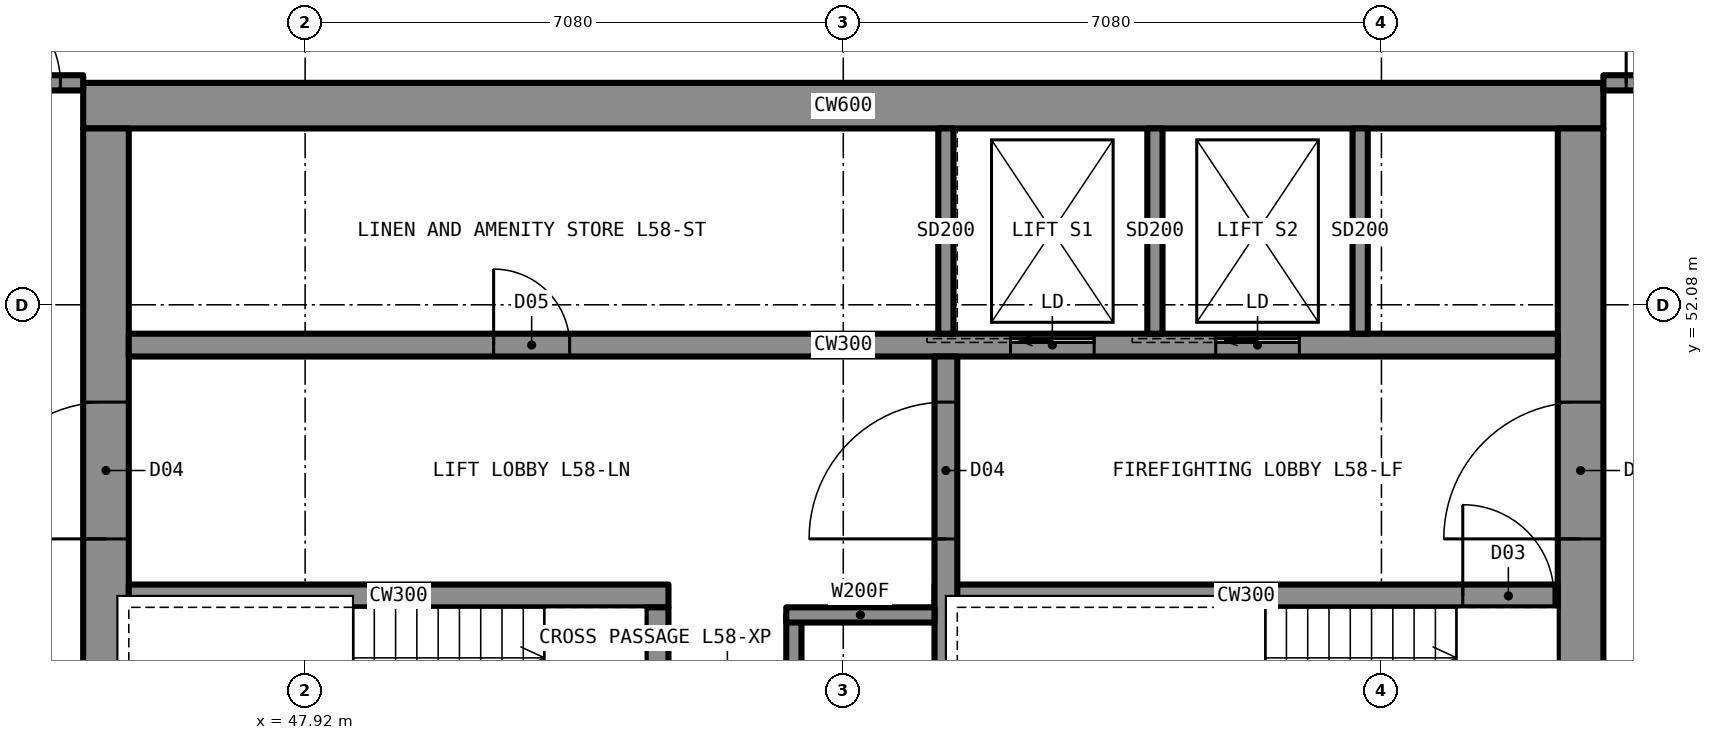
"""IFC4 building model, lengths in metres.
Left out: names, types, materials, properties, quantities, classifications, styles, units other than length and angle.
Written with IfcOpenShell. Run it as: python <this file> out.ifc"""

import sys

from ifc_helpers import new_model, si_unit, direction, frame, frame_2d, origin, place, context, subcontext, project, spatial, rectangle, extrude, element, fill, save


model = new_model("IFC4")
c1 = context("Model", 3, precision=1e-05, world=origin(), true_north=direction((0.0, 1.0)))
c2 = subcontext(c1, "Body", "Model", "MODEL_VIEW")
j1 = project(units=[si_unit("LENGTHUNIT", "METRE"), si_unit("PLANEANGLEUNIT", "RADIAN")], contexts=[c1])
p1 = place(None, origin())
s1 = spatial("IfcSite", under=j1, at=p1, CompositionType="ELEMENT")
p2 = place(p1, origin())
s2 = spatial("IfcBuilding", under=s1, at=p2, CompositionType="ELEMENT")
p3 = place(p2, frame((0.0, 0.0, 214.3)))
s3 = spatial("IfcBuildingStorey", under=s2, at=p3, CompositionType="ELEMENT", Elevation=214.3)
p4 = place(p3, frame((45.0, 54.7, 0.0), z_axis=(0.0, 0.0, 1.0), x_axis=(1.0, 0.0, 0.0)))
e1 = element("IfcWall", 1, at=p4, inside=s3, PredefinedType="SHEAR", context=c2, shape_type="SweptSolid", body=[
    extrude(rectangle(XDim=20.0, YDim=0.6, at=frame_2d((10.0, 0.0))), origin(), (0.0, 0.0, 1.0), 3.5),
])
p5 = place(p3, frame((64.7, 35.6, 0.0), z_axis=(0.0, 0.0, 1.0), x_axis=(0.0, 1.0, 0.0)))
e2 = element("IfcWall", 2, at=p5, inside=s3, PredefinedType="SHEAR", context=c2, shape_type="SweptSolid", body=[
    extrude(rectangle(XDim=18.8, YDim=0.6, at=frame_2d((9.4, 0.0))), origin(), (0.0, 0.0, 1.0), 3.5),
])
p6 = place(p5, frame((13.4, 0.0, 0.0)))
e3 = element("IfcOpeningElement", 3, at=p6, cuts=e2, PredefinedType="OPENING", context=c2, shape_type="SweptSolid", body=[
    extrude(rectangle(XDim=1.8, YDim=2.2, at=frame_2d((0.9, 1.1))), frame((0.0, 0.31, 0.0), z_axis=(0.0, -1.0, 0.0), x_axis=(1.0, 0.0, 0.0)), (0.0, 0.0, 1.0), 0.62),
])
p7 = place(p5, frame((3.6, 0.0, 0.0)))
e4 = element("IfcOpeningElement", 4, at=p7, cuts=e2, PredefinedType="OPENING", context=c2, shape_type="SweptSolid", body=[
    extrude(rectangle(XDim=1.8, YDim=2.2, at=frame_2d((0.9, 1.1))), frame((0.0, 0.31, 0.0), z_axis=(0.0, -1.0, 0.0), x_axis=(1.0, 0.0, 0.0)), (0.0, 0.0, 1.0), 0.62),
])
p8 = place(p3, frame((45.3, 35.6, 0.0), z_axis=(0.0, 0.0, 1.0), x_axis=(0.0, 1.0, 0.0)))
e5 = element("IfcWall", 5, at=p8, inside=s3, PredefinedType="SHEAR", context=c2, shape_type="SweptSolid", body=[
    extrude(rectangle(XDim=18.8, YDim=0.6, at=frame_2d((9.4, 0.0))), origin(), (0.0, 0.0, 1.0), 3.5),
])
p9 = place(p8, frame((13.4, 0.0, 0.0)))
e6 = element("IfcOpeningElement", 6, at=p9, cuts=e5, PredefinedType="OPENING", context=c2, shape_type="SweptSolid", body=[
    extrude(rectangle(XDim=1.8, YDim=2.2, at=frame_2d((0.9, 1.1))), frame((0.0, 0.31, 0.0), z_axis=(0.0, -1.0, 0.0), x_axis=(1.0, 0.0, 0.0)), (0.0, 0.0, 1.0), 0.62),
])
p10 = place(p8, frame((3.6, 0.0, 0.0)))
e7 = element("IfcOpeningElement", 7, at=p10, cuts=e5, PredefinedType="OPENING", context=c2, shape_type="SweptSolid", body=[
    extrude(rectangle(XDim=1.8, YDim=2.2, at=frame_2d((0.9, 1.1))), frame((0.0, 0.31, 0.0), z_axis=(0.0, -1.0, 0.0), x_axis=(1.0, 0.0, 0.0)), (0.0, 0.0, 1.0), 0.62),
])
p11 = place(p8, frame((6.4, 0.0, 0.0)))
e8 = element("IfcOpeningElement", 8, at=p11, cuts=e5, PredefinedType="OPENING", context=c2, shape_type="SweptSolid", body=[
    extrude(rectangle(XDim=1.2, YDim=2.2, at=frame_2d((0.6, 1.1))), frame((0.0, 0.31, 0.0), z_axis=(0.0, -1.0, 0.0), x_axis=(1.0, 0.0, 0.0)), (0.0, 0.0, 1.0), 0.62),
])
p12 = place(p3, frame((45.6, 51.55, 0.0), z_axis=(0.0, 0.0, 1.0), x_axis=(1.0, 0.0, 0.0)))
e9 = element("IfcWall", 9, at=p12, inside=s3, PredefinedType="SHEAR", context=c2, shape_type="SweptSolid", body=[
    extrude(rectangle(XDim=18.8, YDim=0.3, at=frame_2d((9.4, 0.0))), origin(), (0.0, 0.0, 1.0), 3.5),
])
p13 = place(p12, frame((4.8, 0.0, 0.0)))
e10 = element("IfcOpeningElement", 10, at=p13, cuts=e9, PredefinedType="OPENING", context=c2, shape_type="SweptSolid", body=[
    extrude(rectangle(XDim=1.0, YDim=2.1, at=frame_2d((0.5, 1.05))), frame((0.0, 0.16, 0.0), z_axis=(0.0, -1.0, 0.0), x_axis=(1.0, 0.0, 0.0)), (0.0, 0.0, 1.0), 0.32),
])
p14 = place(p12, frame((11.6, 0.0, 0.0)))
e11 = element("IfcOpeningElement", 11, at=p14, cuts=e9, PredefinedType="OPENING", context=c2, shape_type="SweptSolid", body=[
    extrude(rectangle(XDim=1.1, YDim=2.2, at=frame_2d((0.55, 1.1))), frame((0.0, 0.16, 0.0), z_axis=(0.0, -1.0, 0.0), x_axis=(1.0, 0.0, 0.0)), (0.0, 0.0, 1.0), 0.32),
])
p15 = place(p12, frame((14.3, 0.0, 0.0)))
e12 = element("IfcOpeningElement", 12, at=p15, cuts=e9, PredefinedType="OPENING", context=c2, shape_type="SweptSolid", body=[
    extrude(rectangle(XDim=1.1, YDim=2.2, at=frame_2d((0.55, 1.1))), frame((0.0, 0.16, 0.0), z_axis=(0.0, -1.0, 0.0), x_axis=(1.0, 0.0, 0.0)), (0.0, 0.0, 1.0), 0.32),
])
p16 = place(p3, frame((45.6, 48.25, 0.0), z_axis=(0.0, 0.0, 1.0), x_axis=(1.0, 0.0, 0.0)))
e13 = element("IfcWall", 13, at=p16, inside=s3, PredefinedType="SHEAR", context=c2, shape_type="SweptSolid", body=[
    extrude(rectangle(XDim=7.1, YDim=0.3, at=frame_2d((3.55, 0.0))), origin(), (0.0, 0.0, 1.0), 3.5),
])
p17 = place(p3, frame((56.2, 48.25, 0.0), z_axis=(0.0, 0.0, 1.0), x_axis=(1.0, 0.0, 0.0)))
e14 = element("IfcWall", 14, at=p17, inside=s3, PredefinedType="SHEAR", context=c2, shape_type="SweptSolid", body=[
    extrude(rectangle(XDim=8.2, YDim=0.3, at=frame_2d((4.1, 0.0))), origin(), (0.0, 0.0, 1.0), 3.5),
])
p18 = place(p17, frame((6.95, 0.0, 0.0)))
e15 = element("IfcOpeningElement", 15, at=p18, cuts=e14, PredefinedType="OPENING", context=c2, shape_type="SweptSolid", body=[
    extrude(rectangle(XDim=1.2, YDim=2.2, at=frame_2d((0.6, 1.1))), frame((0.0, 0.16, 0.0), z_axis=(0.0, -1.0, 0.0), x_axis=(1.0, 0.0, 0.0)), (0.0, 0.0, 1.0), 0.32),
])
p19 = place(p3, frame((52.55, 41.9, 0.0), z_axis=(0.0, 0.0, 1.0), x_axis=(0.0, 1.0, 0.0)))
e16 = element("IfcWall", 16, at=p19, inside=s3, PredefinedType="SHEAR", context=c2, shape_type="SweptSolid", body=[
    extrude(rectangle(XDim=6.2, YDim=0.3, at=frame_2d((3.1, 0.0))), origin(), (0.0, 0.0, 1.0), 3.5),
])
p20 = place(p19, frame((4.125, 0.0, 0.0)))
e17 = element("IfcOpeningElement", 17, at=p20, cuts=e16, PredefinedType="OPENING", context=c2, shape_type="SweptSolid", body=[
    extrude(rectangle(XDim=1.2, YDim=2.2, at=frame_2d((0.6, 1.1))), frame((0.0, 0.16, 0.0), z_axis=(0.0, -1.0, 0.0), x_axis=(1.0, 0.0, 0.0)), (0.0, 0.0, 1.0), 0.32),
])
p21 = place(p3, frame((56.35, 41.9, 0.0), z_axis=(0.0, 0.0, 1.0), x_axis=(0.0, 1.0, 0.0)))
e18 = element("IfcWall", 18, at=p21, inside=s3, PredefinedType="SHEAR", context=c2, shape_type="SweptSolid", body=[
    extrude(rectangle(XDim=9.5, YDim=0.3, at=frame_2d((4.75, 0.0))), origin(), (0.0, 0.0, 1.0), 3.5),
])
p22 = place(p21, frame((7.1, 0.0, 0.0)))
e19 = element("IfcOpeningElement", 19, at=p22, cuts=e18, PredefinedType="OPENING", context=c2, shape_type="SweptSolid", body=[
    extrude(rectangle(XDim=1.8, YDim=2.2, at=frame_2d((0.9, 1.1))), frame((0.0, 0.16, 0.0), z_axis=(0.0, -1.0, 0.0), x_axis=(1.0, 0.0, 0.0)), (0.0, 0.0, 1.0), 0.32),
])
p23 = place(p3, frame((43.2, 55.0, 0.0), z_axis=(0.0, 0.0, 1.0), x_axis=(1.0, 0.0, 0.0)))
e20 = element("IfcWall", 20, at=p23, inside=s3, PredefinedType="PARTITIONING", context=c2, shape_type="SweptSolid", body=[
    extrude(rectangle(XDim=1.8, YDim=0.2, at=frame_2d((0.9, 0.0))), origin(), (0.0, 0.0, 1.0), 3.33),
])
p24 = place(p23, frame((0.3, 0.0, 0.0)))
e21 = element("IfcOpeningElement", 21, at=p24, cuts=e20, PredefinedType="OPENING", context=c2, shape_type="SweptSolid", body=[
    extrude(rectangle(XDim=1.2, YDim=2.2, at=frame_2d((0.6, 1.1))), frame((0.0, 0.11, 0.0), z_axis=(0.0, -1.0, 0.0), x_axis=(1.0, 0.0, 0.0)), (0.0, 0.0, 1.0), 0.22),
])
p25 = place(p3, frame((65.0, 55.0, 0.0), z_axis=(0.0, 0.0, 1.0), x_axis=(1.0, 0.0, 0.0)))
e22 = element("IfcWall", 22, at=p25, inside=s3, PredefinedType="PARTITIONING", context=c2, shape_type="SweptSolid", body=[
    extrude(rectangle(XDim=1.8, YDim=0.2, at=frame_2d((0.9, 0.0))), origin(), (0.0, 0.0, 1.0), 3.33),
])
p26 = place(p25, frame((0.3, 0.0, 0.0)))
e23 = element("IfcOpeningElement", 23, at=p26, cuts=e22, PredefinedType="OPENING", context=c2, shape_type="SweptSolid", body=[
    extrude(rectangle(XDim=1.2, YDim=2.2, at=frame_2d((0.6, 1.1))), frame((0.0, 0.11, 0.0), z_axis=(0.0, -1.0, 0.0), x_axis=(1.0, 0.0, 0.0)), (0.0, 0.0, 1.0), 0.22),
])
p27 = place(p3, frame((54.35, 44.1, 0.0), z_axis=(0.0, 0.0, 1.0), x_axis=(0.0, 1.0, 0.0)))
e24 = element("IfcWall", 24, at=p27, inside=s3, PredefinedType="PARTITIONING", context=c2, shape_type="SweptSolid", body=[
    extrude(rectangle(XDim=3.9, YDim=0.2, at=frame_2d((1.95, 0.0))), origin(), (0.0, 0.0, 1.0), 3.33),
])
p28 = place(p27, frame((1.45, 0.0, 0.0)))
e25 = element("IfcOpeningElement", 25, at=p28, cuts=e24, PredefinedType="OPENING", context=c2, shape_type="SweptSolid", body=[
    extrude(rectangle(XDim=1.0, YDim=2.1, at=frame_2d((0.5, 1.05))), frame((0.0, 0.11, 0.0), z_axis=(0.0, -1.0, 0.0), x_axis=(1.0, 0.0, 0.0)), (0.0, 0.0, 1.0), 0.22),
])
p29 = place(p3, frame((54.25, 48.0, 0.0), z_axis=(0.0, 0.0, 1.0), x_axis=(1.0, 0.0, 0.0)))
e26 = element("IfcWall", 26, at=p29, inside=s3, PredefinedType="PARTITIONING", context=c2, shape_type="SweptSolid", body=[
    extrude(rectangle(XDim=1.95, YDim=0.2, at=frame_2d((0.975, 0.0))), origin(), (0.0, 0.0, 1.0), 3.33),
])
for number, where, z_axis, x_axis in (
    (27, (59.1, 51.7, 0.0), (0.0, 0.0, 1.0), (0.0, 1.0, 0.0)),
    (28, (61.8, 51.7, 0.0), (0.0, 0.0, 1.0), (0.0, 1.0, 0.0)),
    (29, (56.35, 51.7, 0.0), (0.0, 0.0, 1.0), (0.0, 1.0, 0.0)),
):
    element("IfcWall", number, at=place(p3, frame(where, z_axis=z_axis, x_axis=x_axis)), inside=s3, PredefinedType="PARTITIONING", context=c2, shape_type="SweptSolid", body=[
        extrude(rectangle(XDim=2.7, YDim=0.2, at=frame_2d((1.35, 0.0))), origin(), (0.0, 0.0, 1.0), 3.33),
    ])
p30 = place(p24, origin())
e30 = element("IfcDoor", 30, at=p30, inside=s3, OperationType="SINGLE_SWING_LEFT", PredefinedType="DOOR", context=c2, shape_type="SweptSolid", body=[
    extrude(rectangle(XDim=1.2, YDim=2.2, at=frame_2d((0.6, 1.1))), frame((0.0, 0.025, 0.0), z_axis=(0.0, -1.0, 0.0), x_axis=(1.0, 0.0, 0.0)), (0.0, 0.0, 1.0), 0.05),
])
fill(e21, e30)
p31 = place(p26, origin())
e31 = element("IfcDoor", 31, at=p31, inside=s3, OperationType="SINGLE_SWING_LEFT", PredefinedType="DOOR", context=c2, shape_type="SweptSolid", body=[
    extrude(rectangle(XDim=1.2, YDim=2.2, at=frame_2d((0.6, 1.1))), frame((0.0, 0.025, 0.0), z_axis=(0.0, -1.0, 0.0), x_axis=(1.0, 0.0, 0.0)), (0.0, 0.0, 1.0), 0.05),
])
fill(e23, e31)
p32 = place(p9, origin())
e32 = element("IfcDoor", 32, at=p32, inside=s3, OperationType="DOUBLE_DOOR_SINGLE_SWING", PredefinedType="DOOR", context=c2, shape_type="SweptSolid", body=[
    extrude(rectangle(XDim=1.8, YDim=2.2, at=frame_2d((0.9, 1.1))), frame((0.0, 0.025, 0.0), z_axis=(0.0, -1.0, 0.0), x_axis=(1.0, 0.0, 0.0)), (0.0, 0.0, 1.0), 0.05),
])
fill(e6, e32)
p33 = place(p6, origin())
e33 = element("IfcDoor", 33, at=p33, inside=s3, OperationType="DOUBLE_DOOR_SINGLE_SWING", PredefinedType="DOOR", context=c2, shape_type="SweptSolid", body=[
    extrude(rectangle(XDim=1.8, YDim=2.2, at=frame_2d((0.9, 1.1))), frame((0.0, 0.025, 0.0), z_axis=(0.0, -1.0, 0.0), x_axis=(1.0, 0.0, 0.0)), (0.0, 0.0, 1.0), 0.05),
])
fill(e3, e33)
p34 = place(p22, origin())
e34 = element("IfcDoor", 34, at=p34, inside=s3, OperationType="DOUBLE_DOOR_SINGLE_SWING", PredefinedType="DOOR", context=c2, shape_type="SweptSolid", body=[
    extrude(rectangle(XDim=1.8, YDim=2.2, at=frame_2d((0.9, 1.1))), frame((0.0, 0.025, 0.0), z_axis=(0.0, -1.0, 0.0), x_axis=(1.0, 0.0, 0.0)), (0.0, 0.0, 1.0), 0.05),
])
fill(e19, e34)
p35 = place(p18, origin())
e35 = element("IfcDoor", 35, at=p35, inside=s3, OperationType="SINGLE_SWING_LEFT", PredefinedType="DOOR", context=c2, shape_type="SweptSolid", body=[
    extrude(rectangle(XDim=1.2, YDim=2.2, at=frame_2d((0.6, 1.1))), frame((0.0, 0.025, 0.0), z_axis=(0.0, -1.0, 0.0), x_axis=(1.0, 0.0, 0.0)), (0.0, 0.0, 1.0), 0.05),
])
fill(e15, e35)
p36 = place(p13, origin())
e36 = element("IfcDoor", 36, at=p36, inside=s3, OperationType="SINGLE_SWING_LEFT", PredefinedType="DOOR", context=c2, shape_type="SweptSolid", body=[
    extrude(rectangle(XDim=1.0, YDim=2.1, at=frame_2d((0.5, 1.05))), frame((0.0, 0.025, 0.0), z_axis=(0.0, -1.0, 0.0), x_axis=(1.0, 0.0, 0.0)), (0.0, 0.0, 1.0), 0.05),
])
fill(e10, e36)
p37 = place(p14, origin())
e37 = element("IfcDoor", 37, at=p37, inside=s3, OperationType="SLIDING_TO_LEFT", PredefinedType="DOOR", context=c2, shape_type="SweptSolid", body=[
    extrude(rectangle(XDim=1.1, YDim=2.2, at=frame_2d((0.55, 1.1))), frame((0.0, 0.025, 0.0), z_axis=(0.0, -1.0, 0.0), x_axis=(1.0, 0.0, 0.0)), (0.0, 0.0, 1.0), 0.05),
])
fill(e11, e37)
p38 = place(p15, origin())
e38 = element("IfcDoor", 38, at=p38, inside=s3, OperationType="SLIDING_TO_LEFT", PredefinedType="DOOR", context=c2, shape_type="SweptSolid", body=[
    extrude(rectangle(XDim=1.1, YDim=2.2, at=frame_2d((0.55, 1.1))), frame((0.0, 0.025, 0.0), z_axis=(0.0, -1.0, 0.0), x_axis=(1.0, 0.0, 0.0)), (0.0, 0.0, 1.0), 0.05),
])
fill(e12, e38)
save(model, sys.argv[1])
